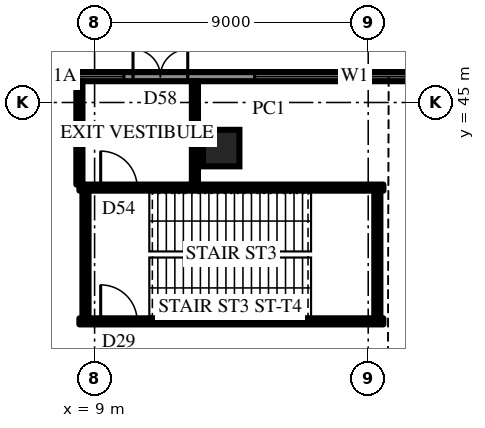
"""IFC4 building model, lengths in metres.
Left out: names, types, materials, properties, quantities, classifications, styles, units other than length and angle.
Written with IfcOpenShell. Run it as: python <this file> out.ifc"""

import sys

from ifc_helpers import new_model, si_unit, direction, frame, frame_2d, origin, origin_2d, place, context, subcontext, project, spatial, rectangle, extrude, element, fill, save


model = new_model("IFC4")
c1 = context("Model", 3, precision=1e-05, world=origin(), true_north=direction((0.0, 1.0)))
c2 = subcontext(c1, "Body", "Model", "MODEL_VIEW")
j1 = project(units=[si_unit("LENGTHUNIT", "METRE"), si_unit("PLANEANGLEUNIT", "RADIAN")], contexts=[c1])
p1 = place(None, origin())
s1 = spatial("IfcSite", under=j1, at=p1, CompositionType="ELEMENT")
p2 = place(p1, origin())
s2 = spatial("IfcBuilding", under=s1, at=p2, CompositionType="ELEMENT")
p3 = place(p2, origin())
s3 = spatial("IfcBuildingStorey", under=s2, at=p3, CompositionType="ELEMENT", Elevation=0.0)
p4 = place(p3, frame((8.5, 37.8, 0.0), z_axis=(0.0, 0.0, 1.0), x_axis=(1.0, 0.0, 0.0)))
e1 = element("IfcWall", 1, at=p4, inside=s3, PredefinedType="SHEAR", context=c2, shape_type="SweptSolid", body=[
    extrude(rectangle(XDim=10.0, YDim=0.2, at=frame_2d((5.0, 0.0))), origin(), (0.0, 0.0, 1.0), 7.0),
])
p5 = place(p4, frame((0.7, 0.0, 0.0)))
e2 = element("IfcOpeningElement", 2, at=p5, cuts=e1, PredefinedType="OPENING", context=c2, shape_type="SweptSolid", body=[
    extrude(rectangle(XDim=1.2, YDim=2.2, at=frame_2d((0.6, 1.1))), frame((0.0, 0.11, 0.0), z_axis=(0.0, -1.0, 0.0), x_axis=(1.0, 0.0, 0.0)), (0.0, 0.0, 1.0), 0.22),
])
p6 = place(p3, frame((18.5, 42.2, 0.0), z_axis=(0.0, 0.0, 1.0), x_axis=(-1.0, 0.0, 0.0)))
e3 = element("IfcWall", 3, at=p6, inside=s3, PredefinedType="SHEAR", context=c2, shape_type="SweptSolid", body=[
    extrude(rectangle(XDim=10.0, YDim=0.2, at=frame_2d((5.0, 0.0))), origin(), (0.0, 0.0, 1.0), 7.0),
])
p7 = place(p6, frame((8.1, 0.0, 0.0)))
e4 = element("IfcOpeningElement", 4, at=p7, cuts=e3, PredefinedType="OPENING", context=c2, shape_type="SweptSolid", body=[
    extrude(rectangle(XDim=1.2, YDim=2.2, at=frame_2d((0.6, 1.1))), frame((0.0, 0.11, 0.0), z_axis=(0.0, -1.0, 0.0), x_axis=(1.0, 0.0, 0.0)), (0.0, 0.0, 1.0), 0.22),
])
for number, where, z_axis, x_axis in (
    (5, (8.7, 42.1, 0.0), (0.0, 0.0, 1.0), (0.0, -1.0, 0.0)),
    (6, (18.3, 37.9, 0.0), (0.0, 0.0, 1.0), (0.0, 1.0, 0.0)),
):
    element("IfcWall", number, at=place(p3, frame(where, z_axis=z_axis, x_axis=x_axis)), inside=s3, PredefinedType="SHEAR", context=c2, shape_type="SweptSolid", body=[
        extrude(rectangle(XDim=4.2, YDim=0.2, at=frame_2d((2.1, 0.0))), origin(), (0.0, 0.0, 1.0), 7.0),
    ])
p8 = place(p3, frame((13.164, 43.5, 0.0), z_axis=(0.0, 0.0, 1.0), x_axis=(-1.0, 0.0, 0.0)))
e7 = element("IfcColumn", 7, at=p8, inside=s3, PredefinedType="COLUMN", context=c2, shape_type="SweptSolid", body=[
    extrude(rectangle(XDim=1.2, YDim=1.2, at=origin_2d()), origin(), (0.0, 0.0, 1.0), 7.0),
])
p9 = place(p3, frame((21.939, 45.85, 0.0), z_axis=(0.0, 0.0, 1.0), x_axis=(-1.0, 0.0, 0.0)))
e8 = element("IfcWall", 8, at=p9, inside=s3, PredefinedType="SOLIDWALL", context=c2, shape_type="SweptSolid", body=[
    extrude(rectangle(XDim=43.878, YDim=0.3, at=frame_2d((21.939, 0.0))), origin(), (0.0, 0.0, 1.0), 6.65),
])
p10 = place(p9, frame((1.1, 0.0, 0.3)))
e9 = element("IfcOpeningElement", 9, at=p10, cuts=e8, PredefinedType="OPENING", context=c2, shape_type="SweptSolid", body=[
    extrude(rectangle(XDim=6.576, YDim=5.0, at=frame_2d((3.288, 2.5))), frame((0.0, 0.16, 0.0), z_axis=(0.0, -1.0, 0.0), x_axis=(1.0, 0.0, 0.0)), (0.0, 0.0, 1.0), 0.32),
])
p11 = place(p9, frame((9.875, 0.0, 0.0)))
e10 = element("IfcOpeningElement", 10, at=p11, cuts=e8, PredefinedType="OPENING", context=c2, shape_type="SweptSolid", body=[
    extrude(rectangle(XDim=1.8, YDim=2.4, at=frame_2d((0.9, 1.2))), frame((0.0, 0.16, 0.0), z_axis=(0.0, -1.0, 0.0), x_axis=(1.0, 0.0, 0.0)), (0.0, 0.0, 1.0), 0.32),
])
p12 = place(p9, frame((11.976, 0.0, 0.3)))
e11 = element("IfcOpeningElement", 11, at=p12, cuts=e8, PredefinedType="OPENING", context=c2, shape_type="SweptSolid", body=[
    extrude(rectangle(XDim=4.476, YDim=5.0, at=frame_2d((2.238, 2.5))), frame((0.0, 0.16, 0.0), z_axis=(0.0, -1.0, 0.0), x_axis=(1.0, 0.0, 0.0)), (0.0, 0.0, 1.0), 0.32),
])
p13 = place(p9, frame((20.189, 0.0, 0.0)))
e12 = element("IfcOpeningElement", 12, at=p13, cuts=e8, PredefinedType="OPENING", context=c2, shape_type="SweptSolid", body=[
    extrude(rectangle(XDim=3.5, YDim=4.5, at=frame_2d((1.75, 2.25))), frame((0.0, 0.16, 0.0), z_axis=(0.0, -1.0, 0.0), x_axis=(1.0, 0.0, 0.0)), (0.0, 0.0, 1.0), 0.32),
])
p14 = place(p9, frame((32.203, 0.0, 0.0)))
e13 = element("IfcOpeningElement", 13, at=p14, cuts=e8, PredefinedType="OPENING", context=c2, shape_type="SweptSolid", body=[
    extrude(rectangle(XDim=1.8, YDim=2.4, at=frame_2d((0.9, 1.2))), frame((0.0, 0.16, 0.0), z_axis=(0.0, -1.0, 0.0), x_axis=(1.0, 0.0, 0.0)), (0.0, 0.0, 1.0), 0.32),
])
p15 = place(p9, frame((27.427, 0.0, 0.3)))
e14 = element("IfcOpeningElement", 14, at=p15, cuts=e8, PredefinedType="OPENING", context=c2, shape_type="SweptSolid", body=[
    extrude(rectangle(XDim=4.476, YDim=5.0, at=frame_2d((2.238, 2.5))), frame((0.0, 0.16, 0.0), z_axis=(0.0, -1.0, 0.0), x_axis=(1.0, 0.0, 0.0)), (0.0, 0.0, 1.0), 0.32),
])
p16 = place(p9, frame((36.203, 0.0, 0.3)))
e15 = element("IfcOpeningElement", 15, at=p16, cuts=e8, PredefinedType="OPENING", context=c2, shape_type="SweptSolid", body=[
    extrude(rectangle(XDim=6.576, YDim=5.0, at=frame_2d((3.288, 2.5))), frame((0.0, 0.16, 0.0), z_axis=(0.0, -1.0, 0.0), x_axis=(1.0, 0.0, 0.0)), (0.0, 0.0, 1.0), 0.32),
])
for number, where, z_axis, x_axis in (
    (16, (12.3, 45.7, 0.0), (0.0, 0.0, 1.0), (0.0, -1.0, 0.0)),
    (17, (8.5, 45.7, 0.0), (0.0, 0.0, 1.0), (0.0, -1.0, 0.0)),
):
    element("IfcWall", number, at=place(p3, frame(where, z_axis=z_axis, x_axis=x_axis)), inside=s3, PredefinedType="PARTITIONING", context=c2, shape_type="SweptSolid", body=[
        extrude(rectangle(XDim=3.4, YDim=0.2, at=frame_2d((1.7, 0.0))), origin(), (0.0, 0.0, 1.0), 6.65),
    ])
p17 = place(p10, origin())
e18 = element("IfcWindow", 18, at=p17, inside=s3, PartitioningType="SINGLE_PANEL", PredefinedType="WINDOW", context=c2, shape_type="SweptSolid", body=[
    extrude(rectangle(XDim=6.576, YDim=5.0, at=frame_2d((3.288, 2.5))), frame((0.0, 0.03, 0.0), z_axis=(0.0, -1.0, 0.0), x_axis=(1.0, 0.0, 0.0)), (0.0, 0.0, 1.0), 0.06),
])
fill(e9, e18)
p18 = place(p11, frame((1.8, 0.0, 0.0), z_axis=(0.0, 0.0, 1.0), x_axis=(-1.0, 0.0, 0.0)))
e19 = element("IfcDoor", 19, at=p18, inside=s3, OperationType="DOUBLE_DOOR_SINGLE_SWING", PredefinedType="DOOR", context=c2, shape_type="SweptSolid", body=[
    extrude(rectangle(XDim=1.8, YDim=2.4, at=frame_2d((0.9, 1.2))), frame((0.0, 0.025, 0.0), z_axis=(0.0, -1.0, 0.0), x_axis=(1.0, 0.0, 0.0)), (0.0, 0.0, 1.0), 0.05),
])
fill(e10, e19)
p19 = place(p12, origin())
e20 = element("IfcWindow", 20, at=p19, inside=s3, PartitioningType="SINGLE_PANEL", PredefinedType="WINDOW", context=c2, shape_type="SweptSolid", body=[
    extrude(rectangle(XDim=4.476, YDim=5.0, at=frame_2d((2.238, 2.5))), frame((0.0, 0.03, 0.0), z_axis=(0.0, -1.0, 0.0), x_axis=(1.0, 0.0, 0.0)), (0.0, 0.0, 1.0), 0.06),
])
fill(e11, e20)
p20 = place(p5, origin())
e21 = element("IfcDoor", 21, at=p20, inside=s3, OperationType="SINGLE_SWING_RIGHT", PredefinedType="DOOR", context=c2, shape_type="SweptSolid", body=[
    extrude(rectangle(XDim=1.2, YDim=2.2, at=frame_2d((0.6, 1.1))), frame((0.0, 0.025, 0.0), z_axis=(0.0, -1.0, 0.0), x_axis=(1.0, 0.0, 0.0)), (0.0, 0.0, 1.0), 0.05),
])
fill(e2, e21)
p21 = place(p7, frame((1.2, 0.0, 0.0), z_axis=(0.0, 0.0, 1.0), x_axis=(-1.0, 0.0, 0.0)))
e22 = element("IfcDoor", 22, at=p21, inside=s3, OperationType="SINGLE_SWING_RIGHT", PredefinedType="DOOR", context=c2, shape_type="SweptSolid", body=[
    extrude(rectangle(XDim=1.2, YDim=2.2, at=frame_2d((0.6, 1.1))), frame((0.0, 0.025, 0.0), z_axis=(0.0, -1.0, 0.0), x_axis=(1.0, 0.0, 0.0)), (0.0, 0.0, 1.0), 0.05),
])
fill(e4, e22)
save(model, sys.argv[1])
